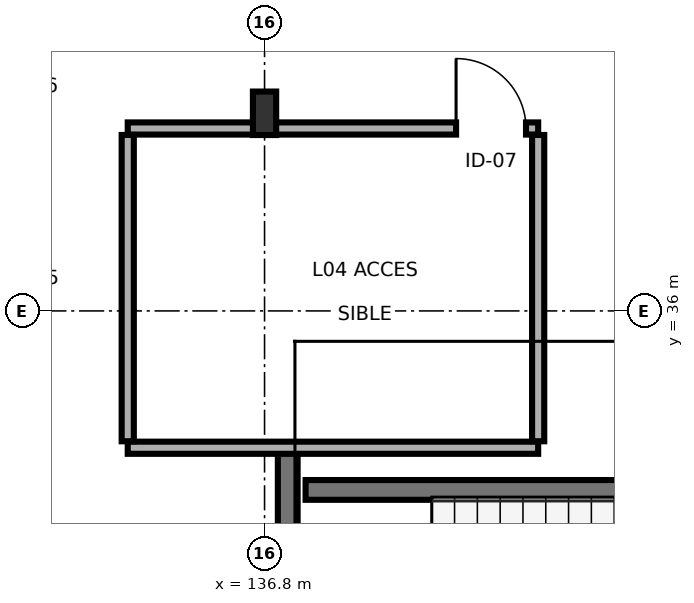
"""IFC4 building model, lengths in metres.
Left out: names, types, materials, properties, quantities, classifications, styles, units other than length and angle.
Written with IfcOpenShell. Run it as: python <this file> out.ifc"""

import sys

from ifc_helpers import new_model, si_unit, direction, frame, frame_2d, origin, origin_2d, place, context, subcontext, project, spatial, rectangle, i_section, extrude, element, fill, save


model = new_model("IFC4")
c1 = context("Model", 3, precision=1e-05, world=origin(), true_north=direction((0.0, 1.0)))
c2 = subcontext(c1, "Body", "Model", "MODEL_VIEW")
j1 = project(units=[si_unit("LENGTHUNIT", "METRE"), si_unit("PLANEANGLEUNIT", "RADIAN")], contexts=[c1])
p1 = place(None, origin())
s1 = spatial("IfcSite", under=j1, at=p1, CompositionType="ELEMENT")
p2 = place(p1, origin())
s2 = spatial("IfcBuilding", under=s1, at=p2, CompositionType="ELEMENT")
p3 = place(p2, frame((0.0, 0.0, 14.7)))
s3 = spatial("IfcBuildingStorey", under=s2, at=p3, CompositionType="ELEMENT", Elevation=14.7)
p4 = place(p3, frame((136.8, 38.6, 0.0), z_axis=(0.0, 0.0, 1.0), x_axis=(1.0, 0.0, 0.0)))
e1 = element("IfcColumn", 1, at=p4, inside=s3, PredefinedType="COLUMN", context=c2, shape_type="SweptSolid", body=[
    extrude(i_section(OverallWidth=0.306, OverallDepth=0.572, WebThickness=0.021, FlangeThickness=0.04, FilletRadius=0.027, at=origin_2d()), origin(), (0.0, 0.0, 1.0), 3.4),
])
p5 = place(p3, frame((137.105, 29.54, 0.0), z_axis=(0.0, 0.0, 1.0), x_axis=(0.0, 1.0, 0.0)))
e2 = element("IfcWall", 2, at=p5, inside=s3, PredefinedType="SHEAR", context=c2, shape_type="SweptSolid", body=[
    extrude(rectangle(XDim=4.635, YDim=0.26, at=frame_2d((2.317, 0.0))), origin(), (0.0, 0.0, 1.0), 3.215),
])
p6 = place(p5, frame((0.61, 0.0, 0.0)))
e3 = element("IfcOpeningElement", 3, at=p6, cuts=e2, PredefinedType="OPENING", context=c2, shape_type="SweptSolid", body=[
    extrude(rectangle(XDim=1.1, YDim=2.2, at=frame_2d((0.55, 1.1))), frame((0.0, 0.14, 0.0), z_axis=(0.0, -1.0, 0.0), x_axis=(1.0, 0.0, 0.0)), (0.0, 0.0, 1.0), 0.28),
])
p7 = place(p3, frame((137.34, 33.645, 0.0), z_axis=(0.0, 0.0, 1.0), x_axis=(1.0, 0.0, 0.0)))
e4 = element("IfcWall", 4, at=p7, inside=s3, PredefinedType="SHEAR", context=c2, shape_type="SweptSolid", body=[
    extrude(rectangle(XDim=8.52, YDim=0.26, at=frame_2d((4.26, 0.0))), origin(), (0.0, 0.0, 1.0), 3.215),
])
p8 = place(p3, frame((135.0, 34.2, 0.0), z_axis=(0.0, 0.0, 1.0), x_axis=(1.0, 0.0, 0.0)))
e5 = element("IfcWall", 5, at=p8, inside=s3, PredefinedType="PARTITIONING", context=c2, shape_type="SweptSolid", body=[
    extrude(rectangle(XDim=5.4, YDim=0.16, at=frame_2d((2.7, 0.0))), origin(), (0.0, 0.0, 1.0), 2.75),
])
p9 = place(p3, frame((135.0, 38.4, 0.0), z_axis=(0.0, 0.0, 1.0), x_axis=(1.0, 0.0, 0.0)))
e6 = element("IfcWall", 6, at=p9, inside=s3, PredefinedType="PARTITIONING", context=c2, shape_type="SweptSolid", body=[
    extrude(rectangle(XDim=5.4, YDim=0.16, at=frame_2d((2.7, 0.0))), origin(), (0.0, 0.0, 1.0), 2.75),
])
p10 = place(p9, frame((4.32, 0.0, 0.0)))
e7 = element("IfcOpeningElement", 7, at=p10, cuts=e6, PredefinedType="OPENING", context=c2, shape_type="SweptSolid", body=[
    extrude(rectangle(XDim=0.92, YDim=2.1, at=frame_2d((0.46, 1.05))), frame((0.0, 0.09, 0.0), z_axis=(0.0, -1.0, 0.0), x_axis=(1.0, 0.0, 0.0)), (0.0, 0.0, 1.0), 0.18),
])
p11 = place(p3, frame((135.0, 34.285, 0.0), z_axis=(0.0, 0.0, 1.0), x_axis=(0.0, 1.0, 0.0)))
e8 = element("IfcWall", 8, at=p11, inside=s3, PredefinedType="PARTITIONING", context=c2, shape_type="SweptSolid", body=[
    extrude(rectangle(XDim=4.03, YDim=0.16, at=frame_2d((2.015, 0.0))), origin(), (0.0, 0.0, 1.0), 2.75),
])
p12 = place(p3, frame((140.4, 34.285, 0.0), z_axis=(0.0, 0.0, 1.0), x_axis=(0.0, 1.0, 0.0)))
e9 = element("IfcWall", 9, at=p12, inside=s3, PredefinedType="PARTITIONING", context=c2, shape_type="SweptSolid", body=[
    extrude(rectangle(XDim=4.03, YDim=0.16, at=frame_2d((2.015, 0.0))), origin(), (0.0, 0.0, 1.0), 3.215),
])
p13 = place(p10, origin())
e10 = element("IfcDoor", 10, at=p13, inside=s3, OperationType="SINGLE_SWING_LEFT", PredefinedType="DOOR", context=c2, shape_type="SweptSolid", body=[
    extrude(rectangle(XDim=0.92, YDim=2.1, at=frame_2d((0.46, 1.05))), frame((0.0, 0.025, 0.0), z_axis=(0.0, -1.0, 0.0), x_axis=(1.0, 0.0, 0.0)), (0.0, 0.0, 1.0), 0.05),
])
fill(e7, e10)
save(model, sys.argv[1])
